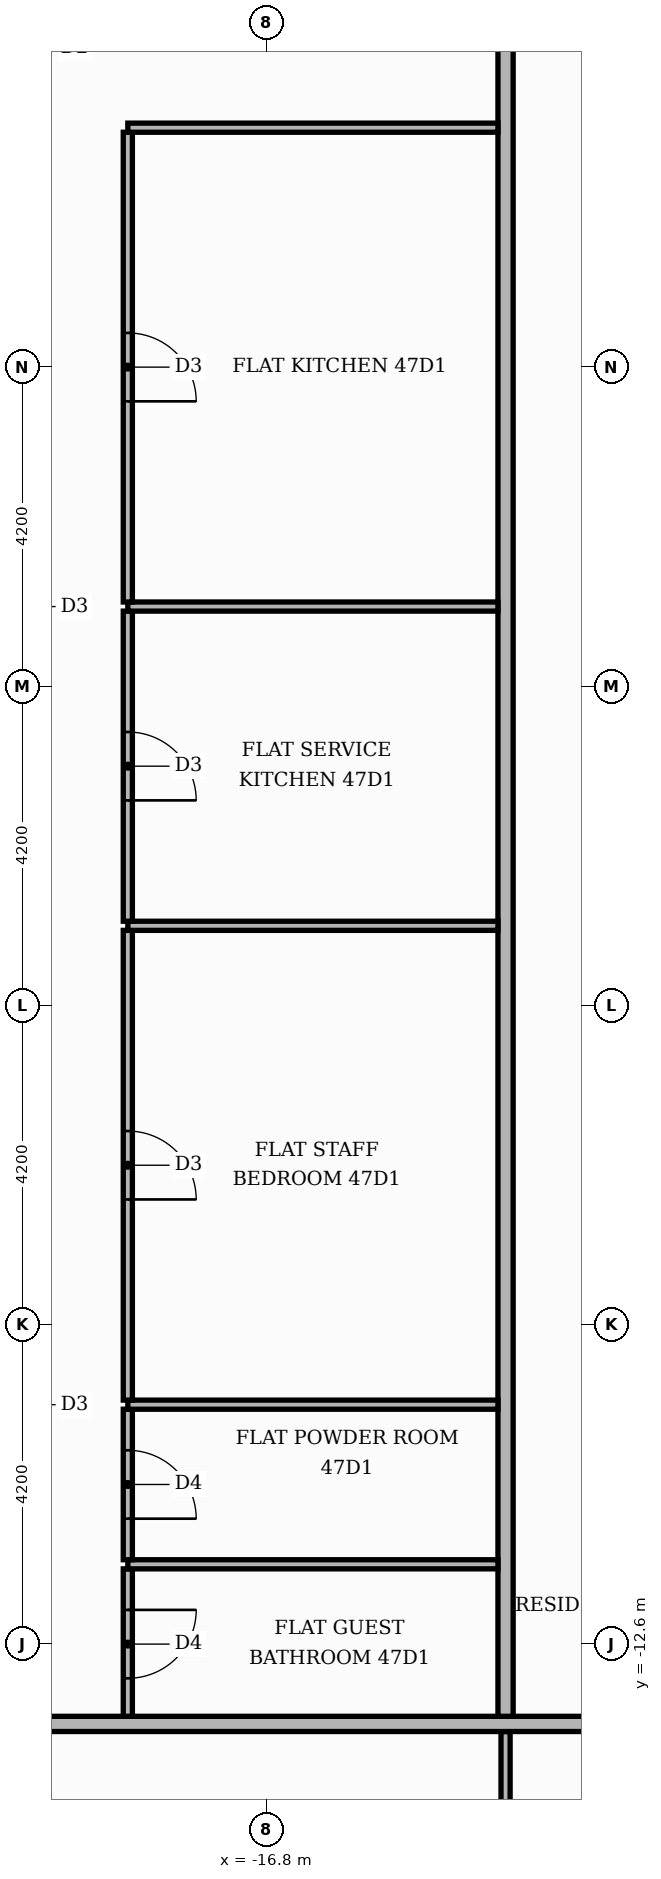
"""IFC4 building model, lengths in metres.
Left out: names, types, materials, properties, quantities, classifications, styles, units other than length and angle.
Written with IfcOpenShell. Run it as: python <this file> out.ifc"""

import sys

from ifc_helpers import new_model, si_unit, direction, frame, frame_2d, origin, place, context, subcontext, project, spatial, rectangle, extrude, element, fill, save


model = new_model("IFC4")
c1 = context("Model", 3, precision=1e-05, world=origin(), true_north=direction((0.0, 1.0)))
c2 = subcontext(c1, "Body", "Model", "MODEL_VIEW")
j1 = project(units=[si_unit("LENGTHUNIT", "METRE"), si_unit("PLANEANGLEUNIT", "RADIAN")], contexts=[c1])
p1 = place(None, origin())
s1 = spatial("IfcSite", under=j1, at=p1, CompositionType="ELEMENT")
p2 = place(p1, origin())
s2 = spatial("IfcBuilding", under=s1, at=p2, CompositionType="ELEMENT")
p3 = place(p2, frame((0.0, 0.0, 200.1)))
s3 = spatial("IfcBuildingStorey", under=s2, at=p3, CompositionType="ELEMENT", Elevation=200.1)
p4 = place(p3, frame((-13.65, -20.36, 0.0), z_axis=(0.0, 0.0, 1.0), x_axis=(0.0, 1.0, 0.0)))
e1 = element("IfcWall", 1, at=p4, inside=s3, PredefinedType="PARTITIONING", context=c2, shape_type="SweptSolid", body=[
    extrude(rectangle(XDim=6.61, YDim=0.12, at=frame_2d((3.305, 0.0))), origin(), (0.0, 0.0, 1.0), 3.48),
])
p5 = place(p4, frame((2.825, 0.0, 0.0)))
e2 = element("IfcOpeningElement", 2, at=p5, cuts=e1, PredefinedType="OPENING", context=c2, shape_type="SweptSolid", body=[
    extrude(rectangle(XDim=1.0, YDim=2.1, at=frame_2d((0.5, 1.05))), frame((0.0, 0.07, 0.0), z_axis=(0.0, -1.0, 0.0), x_axis=(1.0, 0.0, 0.0)), (0.0, 0.0, 1.0), 0.14),
])
p6 = place(p3, frame((-25.42, -13.65, 0.0), z_axis=(0.0, 0.0, 1.0), x_axis=(1.0, 0.0, 0.0)))
e3 = element("IfcWall", 3, at=p6, inside=s3, PredefinedType="PARTITIONING", context=c2, shape_type="SweptSolid", body=[
    extrude(rectangle(XDim=39.07, YDim=0.2, at=frame_2d((19.535, 0.0))), origin(), (0.0, 0.0, 1.0), 3.48),
])
p7 = place(p6, frame((14.37, 0.0, 0.0)))
e4 = element("IfcOpeningElement", 4, at=p7, cuts=e3, PredefinedType="OPENING", context=c2, shape_type="SweptSolid", body=[
    extrude(rectangle(XDim=1.1, YDim=2.4, at=frame_2d((0.55, 1.2))), frame((0.0, 0.11, 0.0), z_axis=(0.0, -1.0, 0.0), x_axis=(1.0, 0.0, 0.0)), (0.0, 0.0, 1.0), 0.22),
])
p8 = place(p3, frame((-18.62, -13.55, 0.0), z_axis=(0.0, 0.0, 1.0), x_axis=(0.0, 1.0, 0.0)))
e5 = element("IfcWall", 5, at=p8, inside=s3, PredefinedType="PARTITIONING", context=c2, shape_type="SweptSolid", body=[
    extrude(rectangle(XDim=1.94, YDim=0.12, at=frame_2d((0.97, 0.0))), origin(), (0.0, 0.0, 1.0), 3.48),
])
p9 = place(p8, frame((0.5, 0.0, 0.0)))
e6 = element("IfcOpeningElement", 6, at=p9, cuts=e5, PredefinedType="OPENING", context=c2, shape_type="SweptSolid", body=[
    extrude(rectangle(XDim=0.9, YDim=2.1, at=frame_2d((0.45, 1.05))), frame((0.0, 0.07, 0.0), z_axis=(0.0, -1.0, 0.0), x_axis=(1.0, 0.0, 0.0)), (0.0, 0.0, 1.0), 0.14),
])
p10 = place(p3, frame((-13.65, -13.55, 0.0), z_axis=(0.0, 0.0, 1.0), x_axis=(0.0, 1.0, 0.0)))
e7 = element("IfcWall", 7, at=p10, inside=s3, PredefinedType="PARTITIONING", context=c2, shape_type="SweptSolid", body=[
    extrude(rectangle(XDim=27.1, YDim=0.2, at=frame_2d((13.55, 0.0))), origin(), (0.0, 0.0, 1.0), 3.48),
])
p11 = place(p10, frame((23.5, 0.0, 0.0)))
e8 = element("IfcOpeningElement", 8, at=p11, cuts=e7, PredefinedType="OPENING", context=c2, shape_type="SweptSolid", body=[
    extrude(rectangle(XDim=1.1, YDim=2.4, at=frame_2d((0.55, 1.2))), frame((0.0, 0.11, 0.0), z_axis=(0.0, -1.0, 0.0), x_axis=(1.0, 0.0, 0.0)), (0.0, 0.0, 1.0), 0.22),
])
p12 = place(p3, frame((-18.62, -11.55, 0.0), z_axis=(0.0, 0.0, 1.0), x_axis=(1.0, 0.0, 0.0)))
e9 = element("IfcWall", 9, at=p12, inside=s3, PredefinedType="PARTITIONING", context=c2, shape_type="SweptSolid", body=[
    extrude(rectangle(XDim=4.87, YDim=0.12, at=frame_2d((2.435, 0.0))), origin(), (0.0, 0.0, 1.0), 3.48),
])
p13 = place(p3, frame((-18.62, -11.49, 0.0), z_axis=(0.0, 0.0, 1.0), x_axis=(0.0, 1.0, 0.0)))
e10 = element("IfcWall", 10, at=p13, inside=s3, PredefinedType="PARTITIONING", context=c2, shape_type="SweptSolid", body=[
    extrude(rectangle(XDim=1.98, YDim=0.12, at=frame_2d((0.99, 0.0))), origin(), (0.0, 0.0, 1.0), 3.48),
])
p14 = place(p13, frame((0.54, 0.0, 0.0)))
e11 = element("IfcOpeningElement", 11, at=p14, cuts=e10, PredefinedType="OPENING", context=c2, shape_type="SweptSolid", body=[
    extrude(rectangle(XDim=0.9, YDim=2.1, at=frame_2d((0.45, 1.05))), frame((0.0, 0.07, 0.0), z_axis=(0.0, -1.0, 0.0), x_axis=(1.0, 0.0, 0.0)), (0.0, 0.0, 1.0), 0.14),
])
p15 = place(p3, frame((-18.62, -9.45, 0.0), z_axis=(0.0, 0.0, 1.0), x_axis=(1.0, 0.0, 0.0)))
e12 = element("IfcWall", 12, at=p15, inside=s3, PredefinedType="PARTITIONING", context=c2, shape_type="SweptSolid", body=[
    extrude(rectangle(XDim=4.87, YDim=0.12, at=frame_2d((2.435, 0.0))), origin(), (0.0, 0.0, 1.0), 3.48),
])
p16 = place(p3, frame((-18.62, -9.39, 0.0), z_axis=(0.0, 0.0, 1.0), x_axis=(0.0, 1.0, 0.0)))
e13 = element("IfcWall", 13, at=p16, inside=s3, PredefinedType="PARTITIONING", context=c2, shape_type="SweptSolid", body=[
    extrude(rectangle(XDim=6.18, YDim=0.12, at=frame_2d((3.09, 0.0))), origin(), (0.0, 0.0, 1.0), 3.48),
])
p17 = place(p16, frame((2.64, 0.0, 0.0)))
e14 = element("IfcOpeningElement", 14, at=p17, cuts=e13, PredefinedType="OPENING", context=c2, shape_type="SweptSolid", body=[
    extrude(rectangle(XDim=0.9, YDim=2.1, at=frame_2d((0.45, 1.05))), frame((0.0, 0.07, 0.0), z_axis=(0.0, -1.0, 0.0), x_axis=(1.0, 0.0, 0.0)), (0.0, 0.0, 1.0), 0.14),
])
p18 = place(p3, frame((-18.62, -3.15, 0.0), z_axis=(0.0, 0.0, 1.0), x_axis=(1.0, 0.0, 0.0)))
e15 = element("IfcWall", 15, at=p18, inside=s3, PredefinedType="PARTITIONING", context=c2, shape_type="SweptSolid", body=[
    extrude(rectangle(XDim=4.87, YDim=0.12, at=frame_2d((2.435, 0.0))), origin(), (0.0, 0.0, 1.0), 3.48),
])
p19 = place(p3, frame((-18.62, -3.09, 0.0), z_axis=(0.0, 0.0, 1.0), x_axis=(0.0, 1.0, 0.0)))
e16 = element("IfcWall", 16, at=p19, inside=s3, PredefinedType="PARTITIONING", context=c2, shape_type="SweptSolid", body=[
    extrude(rectangle(XDim=4.08, YDim=0.12, at=frame_2d((2.04, 0.0))), origin(), (0.0, 0.0, 1.0), 3.48),
])
p20 = place(p19, frame((1.59, 0.0, 0.0)))
e17 = element("IfcOpeningElement", 17, at=p20, cuts=e16, PredefinedType="OPENING", context=c2, shape_type="SweptSolid", body=[
    extrude(rectangle(XDim=0.9, YDim=2.1, at=frame_2d((0.45, 1.05))), frame((0.0, 0.07, 0.0), z_axis=(0.0, -1.0, 0.0), x_axis=(1.0, 0.0, 0.0)), (0.0, 0.0, 1.0), 0.14),
])
p21 = place(p3, frame((-18.62, 1.05, 0.0), z_axis=(0.0, 0.0, 1.0), x_axis=(1.0, 0.0, 0.0)))
e18 = element("IfcWall", 18, at=p21, inside=s3, PredefinedType="PARTITIONING", context=c2, shape_type="SweptSolid", body=[
    extrude(rectangle(XDim=4.87, YDim=0.12, at=frame_2d((2.435, 0.0))), origin(), (0.0, 0.0, 1.0), 3.48),
])
p22 = place(p3, frame((-18.62, 1.11, 0.0), z_axis=(0.0, 0.0, 1.0), x_axis=(0.0, 1.0, 0.0)))
e19 = element("IfcWall", 19, at=p22, inside=s3, PredefinedType="PARTITIONING", context=c2, shape_type="SweptSolid", body=[
    extrude(rectangle(XDim=6.18, YDim=0.12, at=frame_2d((3.09, 0.0))), origin(), (0.0, 0.0, 1.0), 3.48),
])
p23 = place(p22, frame((2.64, 0.0, 0.0)))
e20 = element("IfcOpeningElement", 20, at=p23, cuts=e19, PredefinedType="OPENING", context=c2, shape_type="SweptSolid", body=[
    extrude(rectangle(XDim=0.9, YDim=2.1, at=frame_2d((0.45, 1.05))), frame((0.0, 0.07, 0.0), z_axis=(0.0, -1.0, 0.0), x_axis=(1.0, 0.0, 0.0)), (0.0, 0.0, 1.0), 0.14),
])
p24 = place(p3, frame((-18.62, 7.35, 0.0), z_axis=(0.0, 0.0, 1.0), x_axis=(1.0, 0.0, 0.0)))
e21 = element("IfcWall", 21, at=p24, inside=s3, PredefinedType="PARTITIONING", context=c2, shape_type="SweptSolid", body=[
    extrude(rectangle(XDim=4.87, YDim=0.12, at=frame_2d((2.435, 0.0))), origin(), (0.0, 0.0, 1.0), 3.48),
])
p25 = place(p23, frame((0.9, 0.0, 0.0), z_axis=(0.0, 0.0, 1.0), x_axis=(-1.0, 0.0, 0.0)))
e22 = element("IfcDoor", 22, at=p25, inside=s3, OperationType="SINGLE_SWING_LEFT", PredefinedType="DOOR", context=c2, shape_type="SweptSolid", body=[
    extrude(rectangle(XDim=0.9, YDim=2.1, at=frame_2d((0.45, 1.05))), frame((0.0, 0.025, 0.0), z_axis=(0.0, -1.0, 0.0), x_axis=(1.0, 0.0, 0.0)), (0.0, 0.0, 1.0), 0.05),
])
fill(e20, e22)
p26 = place(p20, frame((0.9, 0.0, 0.0), z_axis=(0.0, 0.0, 1.0), x_axis=(-1.0, 0.0, 0.0)))
e23 = element("IfcDoor", 23, at=p26, inside=s3, OperationType="SINGLE_SWING_LEFT", PredefinedType="DOOR", context=c2, shape_type="SweptSolid", body=[
    extrude(rectangle(XDim=0.9, YDim=2.1, at=frame_2d((0.45, 1.05))), frame((0.0, 0.025, 0.0), z_axis=(0.0, -1.0, 0.0), x_axis=(1.0, 0.0, 0.0)), (0.0, 0.0, 1.0), 0.05),
])
fill(e17, e23)
p27 = place(p17, frame((0.9, 0.0, 0.0), z_axis=(0.0, 0.0, 1.0), x_axis=(-1.0, 0.0, 0.0)))
e24 = element("IfcDoor", 24, at=p27, inside=s3, OperationType="SINGLE_SWING_LEFT", PredefinedType="DOOR", context=c2, shape_type="SweptSolid", body=[
    extrude(rectangle(XDim=0.9, YDim=2.1, at=frame_2d((0.45, 1.05))), frame((0.0, 0.025, 0.0), z_axis=(0.0, -1.0, 0.0), x_axis=(1.0, 0.0, 0.0)), (0.0, 0.0, 1.0), 0.05),
])
fill(e14, e24)
p28 = place(p14, frame((0.9, 0.0, 0.0), z_axis=(0.0, 0.0, 1.0), x_axis=(-1.0, 0.0, 0.0)))
e25 = element("IfcDoor", 25, at=p28, inside=s3, OperationType="SINGLE_SWING_LEFT", PredefinedType="DOOR", context=c2, shape_type="SweptSolid", body=[
    extrude(rectangle(XDim=0.9, YDim=2.1, at=frame_2d((0.45, 1.05))), frame((0.0, 0.025, 0.0), z_axis=(0.0, -1.0, 0.0), x_axis=(1.0, 0.0, 0.0)), (0.0, 0.0, 1.0), 0.05),
])
fill(e11, e25)
p29 = place(p9, frame((0.9, 0.0, 0.0), z_axis=(0.0, 0.0, 1.0), x_axis=(-1.0, 0.0, 0.0)))
e26 = element("IfcDoor", 26, at=p29, inside=s3, OperationType="SINGLE_SWING_RIGHT", PredefinedType="DOOR", context=c2, shape_type="SweptSolid", body=[
    extrude(rectangle(XDim=0.9, YDim=2.1, at=frame_2d((0.45, 1.05))), frame((0.0, 0.025, 0.0), z_axis=(0.0, -1.0, 0.0), x_axis=(1.0, 0.0, 0.0)), (0.0, 0.0, 1.0), 0.05),
])
fill(e6, e26)
save(model, sys.argv[1])
